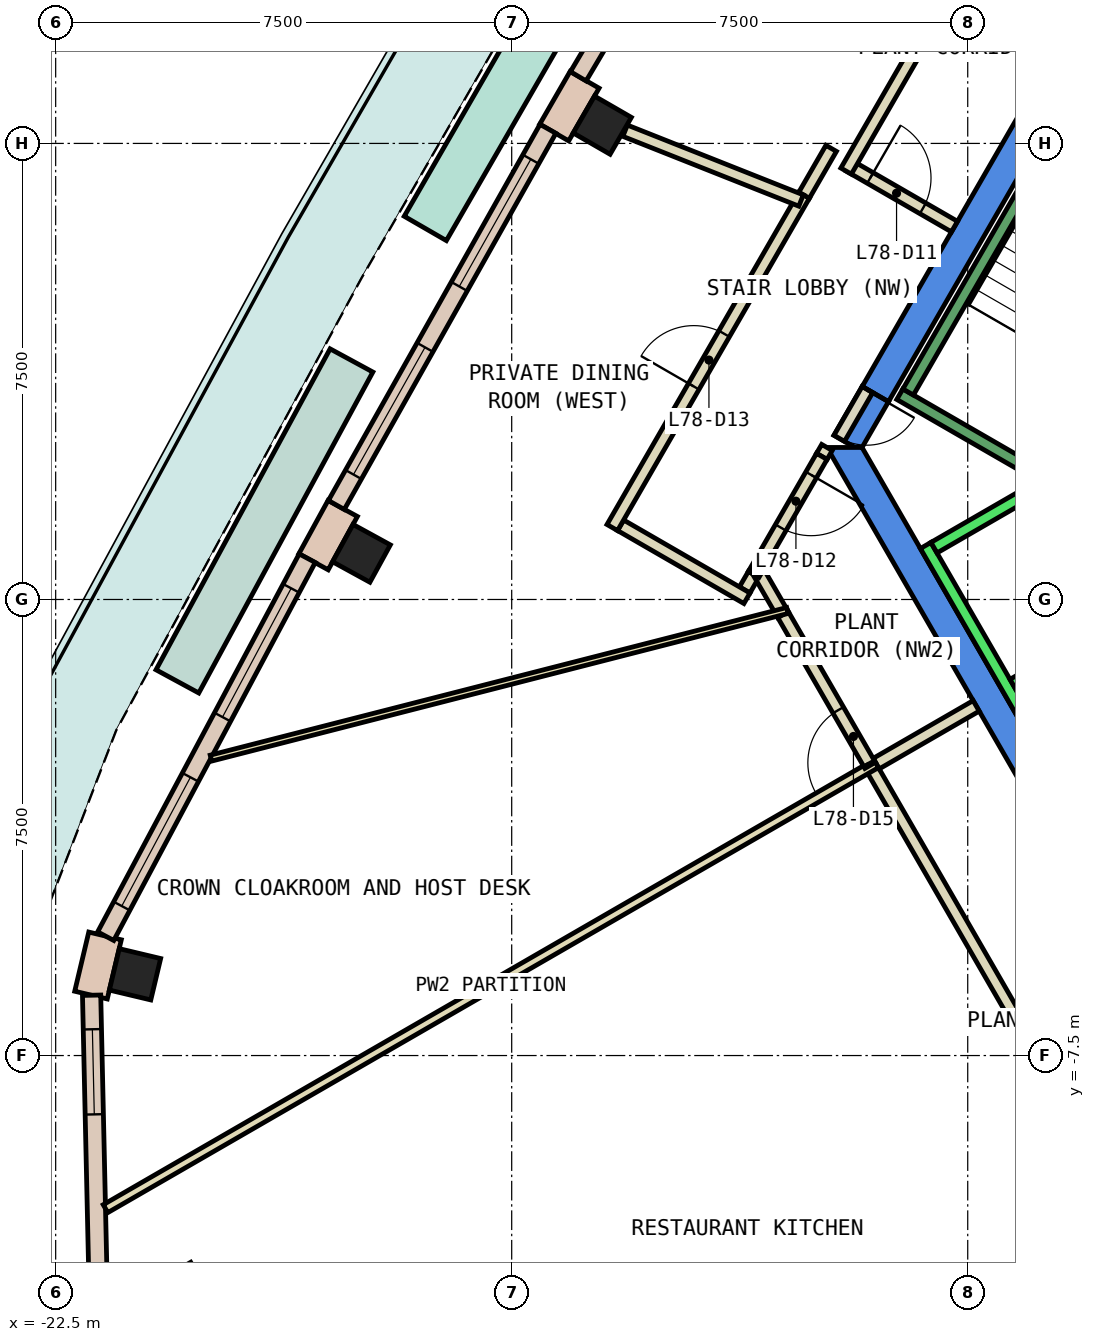
"""IFC4 building model, lengths in metres.
Left out: names, types, materials, properties, quantities, classifications, styles, units other than length and angle.
Written with IfcOpenShell. Run it as: python <this file> out.ifc"""

import sys

from ifc_helpers import new_model, si_unit, direction, frame, frame_2d, origin, origin_2d, place, context, subcontext, project, spatial, polyline, rectangle, outline, extrude, element, fill, save


model = new_model("IFC4")
c1 = context("Model", 3, precision=1e-05, world=origin(), true_north=direction((0.0, 1.0)))
c2 = subcontext(c1, "Body", "Model", "MODEL_VIEW")
j1 = project(units=[si_unit("LENGTHUNIT", "METRE"), si_unit("PLANEANGLEUNIT", "RADIAN")], contexts=[c1])
p1 = place(None, origin())
s1 = spatial("IfcSite", under=j1, at=p1, CompositionType="ELEMENT")
p2 = place(p1, origin())
s2 = spatial("IfcBuilding", under=s1, at=p2, CompositionType="ELEMENT")
p3 = place(p2, frame((0.0, 0.0, 331.4)))
s3 = spatial("IfcBuildingStorey", under=s2, at=p3, CompositionType="ELEMENT", Elevation=331.4)
for number, where, z_axis, x_axis in (
    (1, (-13.51, 7.8, 0.0), (0.0, 0.0, 1.0), (0.5, 0.866, 0.0)),
    (2, (-17.471, 0.759, 0.0), (0.0, 0.0, 1.0), (0.48, 0.877, 0.0)),
    (3, (-21.195, -6.164, 0.0), (0.0, 0.0, 1.0), (0.232, 0.973, 0.0)),
):
    element("IfcColumn", number, at=place(p3, frame(where, z_axis=z_axis, x_axis=x_axis)), inside=s3, PredefinedType="COLUMN", context=c2, shape_type="SweptSolid", body=[
        extrude(rectangle(XDim=0.7, YDim=0.7, at=origin_2d()), origin(), (0.0, 0.0, 1.0), 4.15),
    ])
p4 = place(p3, frame((-20.535, -11.856, 0.0), z_axis=(0.0, 0.0, 1.0), x_axis=(0.866025403784, 0.5, 0.0)))
e4 = element("IfcColumn", 4, at=p4, inside=s3, PredefinedType="COLUMN", context=c2, shape_type="SweptSolid", body=[
    extrude(rectangle(XDim=1.4, YDim=1.4, at=origin_2d()), origin(), (0.0, 0.0, 1.0), 4.15),
])
p5 = place(p3, frame((0.0, 0.0, -0.45)))
e5 = element("IfcWall", 5, at=p5, inside=s3, PredefinedType="SHEAR", context=c2, shape_type="SweptSolid", body=[
    extrude(outline(polyline([(-9.236, 3.502), (-8.803, 3.253), (-4.619, 10.5), (-4.907, 11.0), (-9.236, 3.502)])), origin(), (0.0, 0.0, 1.0), 4.6),
])
p6 = place(p3, frame((0.0, 0.0, 3.6)))
e6 = element("IfcWall", 6, at=p6, inside=s3, PredefinedType="SHEAR", context=c2, shape_type="SweptSolid", body=[
    extrude(outline(polyline([(-9.7, 2.7), (-9.354, 2.5), (-9.238, 2.5), (-8.803, 3.253), (-9.236, 3.502), (-9.7, 2.7)])), origin(), (0.0, 0.0, 1.0), 0.55),
])
p7 = place(p3, frame((0.0, 0.0, -0.45)))
e7 = element("IfcWall", 7, at=p7, inside=s3, PredefinedType="SHEAR", context=c2, shape_type="SweptSolid", body=[
    extrude(outline(polyline([(-9.815, 2.5), (-4.907, -6.0), (-4.619, -5.5), (-9.238, 2.5), (-9.815, 2.5)])), origin(), (0.0, 0.0, 1.0), 4.6),
])
p8 = place(p3, frame((-13.801, 8.546, 0.0), z_axis=(0.0, 0.0, 1.0), x_axis=(-0.49960277677, -0.866254619292, 0.0)))
e8 = element("IfcWall", 8, at=p8, inside=s3, PredefinedType="STANDARD", context=c2, shape_type="SweptSolid", body=[
    extrude(rectangle(XDim=1.001, YDim=0.55, at=frame_2d((0.5, 0.0))), origin(), (0.0, 0.0, 1.0), 4.15),
])
p9 = place(p3, frame((-17.779, 1.497, 0.0), z_axis=(0.0, 0.0, 1.0), x_axis=(-0.480117793957, -0.877204026396, 0.0)))
e9 = element("IfcWall", 9, at=p9, inside=s3, PredefinedType="STANDARD", context=c2, shape_type="SweptSolid", body=[
    extrude(rectangle(XDim=1.0, YDim=0.55, at=frame_2d((0.5, 0.0))), origin(), (0.0, 0.0, 1.0), 4.15),
])
p10 = place(p3, frame((-21.688, -5.533, 0.0), z_axis=(0.0, 0.0, 1.0), x_axis=(-0.230916459446, -0.972973580709, 0.0)))
e10 = element("IfcWall", 10, at=p10, inside=s3, PredefinedType="STANDARD", context=c2, shape_type="SweptSolid", body=[
    extrude(rectangle(XDim=1.0, YDim=0.55, at=frame_2d((0.5, 0.0))), origin(), (0.0, 0.0, 1.0), 4.15),
])
p11 = place(p3, frame((-10.287, 14.711, 0.0), z_axis=(0.0, 0.0, 1.0), x_axis=(-0.509697735304, -0.86035354281, 0.0)))
e11 = element("IfcWall", 11, at=p11, inside=s3, PredefinedType="STANDARD", context=c2, shape_type="SweptSolid", body=[
    extrude(rectangle(XDim=7.098, YDim=0.3, at=frame_2d((3.549, 0.0))), origin(), (0.0, 0.0, 1.0), 4.15),
])
p12 = place(p11, frame((0.775, 0.0, 0.0)))
e12 = element("IfcOpeningElement", 12, at=p12, cuts=e11, PredefinedType="OPENING", context=c2, shape_type="SweptSolid", body=[
    extrude(rectangle(XDim=2.0, YDim=2.4, at=frame_2d((1.0, 1.2))), frame((0.0, 0.16, 0.0), z_axis=(0.0, -1.0, 0.0), x_axis=(1.0, 0.0, 0.0)), (0.0, 0.0, 1.0), 0.32),
])
p13 = place(p11, frame((4.124, 0.0, 0.9)))
e13 = element("IfcOpeningElement", 13, at=p13, cuts=e11, PredefinedType="OPENING", context=c2, shape_type="SweptSolid", body=[
    extrude(rectangle(XDim=2.4, YDim=3.0, at=frame_2d((1.2, 1.5))), frame((0.0, 0.16, 0.0), z_axis=(0.0, -1.0, 0.0), x_axis=(1.0, 0.0, 0.0)), (0.0, 0.0, 1.0), 0.32),
])
p14 = place(p3, frame((-14.404, 7.74, 0.0), z_axis=(0.0, 0.0, 1.0), x_axis=(-0.49029716741, -0.871555326775, 0.0)))
e14 = element("IfcWall", 14, at=p14, inside=s3, PredefinedType="STANDARD", context=c2, shape_type="SweptSolid", body=[
    extrude(rectangle(XDim=7.098, YDim=0.3, at=frame_2d((3.549, 0.0))), origin(), (0.0, 0.0, 1.0), 4.15),
])
p15 = place(p14, frame((0.574, 0.0, 0.9)))
e15 = element("IfcOpeningElement", 15, at=p15, cuts=e14, PredefinedType="OPENING", context=c2, shape_type="SweptSolid", body=[
    extrude(rectangle(XDim=2.4, YDim=3.0, at=frame_2d((1.2, 1.5))), frame((0.0, 0.16, 0.0), z_axis=(0.0, -1.0, 0.0), x_axis=(1.0, 0.0, 0.0)), (0.0, 0.0, 1.0), 0.32),
])
p16 = place(p14, frame((4.123, 0.0, 0.9)))
e16 = element("IfcOpeningElement", 16, at=p16, cuts=e14, PredefinedType="OPENING", context=c2, shape_type="SweptSolid", body=[
    extrude(rectangle(XDim=2.4, YDim=3.0, at=frame_2d((1.2, 1.5))), frame((0.0, 0.16, 0.0), z_axis=(0.0, -1.0, 0.0), x_axis=(1.0, 0.0, 0.0)), (0.0, 0.0, 1.0), 0.32),
])
p17 = place(p3, frame((-18.363, 0.679, 0.0), z_axis=(0.0, 0.0, 1.0), x_axis=(-0.470447918342, -0.882427762555, 0.0)))
e17 = element("IfcWall", 17, at=p17, inside=s3, PredefinedType="STANDARD", context=c2, shape_type="SweptSolid", body=[
    extrude(rectangle(XDim=7.044, YDim=0.3, at=frame_2d((3.522, 0.0))), origin(), (0.0, 0.0, 1.0), 4.15),
])
p18 = place(p17, frame((0.561, 0.0, 0.9)))
e18 = element("IfcOpeningElement", 18, at=p18, cuts=e17, PredefinedType="OPENING", context=c2, shape_type="SweptSolid", body=[
    extrude(rectangle(XDim=2.4, YDim=3.0, at=frame_2d((1.2, 1.5))), frame((0.0, 0.16, 0.0), z_axis=(0.0, -1.0, 0.0), x_axis=(1.0, 0.0, 0.0)), (0.0, 0.0, 1.0), 0.32),
])
p19 = place(p17, frame((4.083, 0.0, 0.9)))
e19 = element("IfcOpeningElement", 19, at=p19, cuts=e17, PredefinedType="OPENING", context=c2, shape_type="SweptSolid", body=[
    extrude(rectangle(XDim=2.4, YDim=3.0, at=frame_2d((1.2, 1.5))), frame((0.0, 0.16, 0.0), z_axis=(0.0, -1.0, 0.0), x_axis=(1.0, 0.0, 0.0)), (0.0, 0.0, 1.0), 0.32),
])
p20 = place(p3, frame((-21.909, -6.508, 0.0), z_axis=(0.0, 0.0, 1.0), x_axis=(0.022431960078, -0.999748371925, 0.0)))
e20 = element("IfcWall", 20, at=p20, inside=s3, PredefinedType="STANDARD", context=c2, shape_type="SweptSolid", body=[
    extrude(rectangle(XDim=5.039, YDim=0.3, at=frame_2d((2.52, 0.0))), origin(), (0.0, 0.0, 1.0), 4.15),
])
p21 = place(p20, frame((0.56, 0.0, 0.9)))
e21 = element("IfcOpeningElement", 21, at=p21, cuts=e20, PredefinedType="OPENING", context=c2, shape_type="SweptSolid", body=[
    extrude(rectangle(XDim=1.4, YDim=3.0, at=frame_2d((0.7, 1.5))), frame((0.0, 0.16, 0.0), z_axis=(0.0, -1.0, 0.0), x_axis=(1.0, 0.0, 0.0)), (0.0, 0.0, 1.0), 0.32),
])
p22 = place(p3, frame((-13.495, 11.17, 0.0), z_axis=(0.0, 0.0, 1.0), x_axis=(-0.499980071345, -0.866036909293, 0.0)))
e22 = element("IfcWall", 22, at=p22, inside=s3, PredefinedType="STANDARD", context=c2, shape_type="SweptSolid", body=[
    extrude(rectangle(XDim=5.852, YDim=0.8, at=frame_2d((2.926, 0.0))), origin(), (0.0, 0.0, 1.0), 0.8),
])
p23 = place(p3, frame((-17.635, 3.931, 0.0), z_axis=(0.0, 0.0, 1.0), x_axis=(-0.476825343116, -0.878998061524, 0.0)))
e23 = element("IfcWall", 23, at=p23, inside=s3, PredefinedType="STANDARD", context=c2, shape_type="SweptSolid", body=[
    extrude(rectangle(XDim=6.004, YDim=0.8, at=frame_2d((3.002, 0.0))), origin(), (0.0, 0.0, 1.0), 0.8),
])
p24 = place(p3, frame((-6.112, -7.913, 0.0), z_axis=(0.0, 0.0, 1.0), x_axis=(-0.499915430684, 0.866074224396, 0.0)))
e24 = element("IfcWall", 24, at=p24, inside=s3, PredefinedType="PARTITIONING", context=c2, shape_type="SweptSolid", body=[
    extrude(rectangle(XDim=5.987, YDim=0.2, at=frame_2d((2.993, 0.0))), origin(), (0.0, 0.0, 1.0), 4.15),
])
p25 = place(p3, frame((-9.006, -2.7, 0.0), z_axis=(0.0, 0.0, 1.0), x_axis=(0.865980106173, 0.500078449558, 0.0)))
e25 = element("IfcWall", 25, at=p25, inside=s3, PredefinedType="PARTITIONING", context=c2, shape_type="SweptSolid", body=[
    extrude(rectangle(XDim=1.9, YDim=0.2, at=frame_2d((0.95, 0.0))), origin(), (0.0, 0.0, 1.0), 4.15),
])
p26 = place(p3, frame((-21.68, -10.018, 0.0), z_axis=(0.0, 0.0, 1.0), x_axis=(0.865999449672, 0.500044951147, 0.0)))
e26 = element("IfcWall", 26, at=p26, inside=s3, PredefinedType="PARTITIONING", context=c2, shape_type="SweptSolid", body=[
    extrude(rectangle(XDim=14.635, YDim=0.15, at=frame_2d((7.317, 0.0))), origin(), (0.0, 0.0, 1.0), 4.15),
])
p27 = place(p3, frame((-9.45, 7.132, 0.0), z_axis=(0.0, 0.0, 1.0), x_axis=(0.866010750942, -0.50002537861, 0.0)))
e27 = element("IfcWall", 27, at=p27, inside=s3, PredefinedType="PARTITIONING", context=c2, shape_type="SweptSolid", body=[
    extrude(rectangle(XDim=2.0, YDim=0.2, at=frame_2d((1.0, 0.0))), origin(), (0.0, 0.0, 1.0), 4.15),
])
p28 = place(p27, frame((0.4, 0.0, 0.0)))
e28 = element("IfcOpeningElement", 28, at=p28, cuts=e27, PredefinedType="OPENING", context=c2, shape_type="SweptSolid", body=[
    extrude(rectangle(XDim=1.0, YDim=2.1, at=frame_2d((0.5, 1.05))), frame((0.0, 0.11, 0.0), z_axis=(0.0, -1.0, 0.0), x_axis=(1.0, 0.0, 0.0)), (0.0, 0.0, 1.0), 0.22),
])
p29 = place(p3, frame((-9.815, 2.5, 0.0), z_axis=(0.0, 0.0, 1.0), x_axis=(-0.5004692653, -0.865754303766, 0.0)))
e29 = element("IfcWall", 29, at=p29, inside=s3, PredefinedType="PARTITIONING", context=c2, shape_type="SweptSolid", body=[
    extrude(rectangle(XDim=0.17, YDim=0.2, at=frame_2d((0.085, 0.0))), origin(), (0.0, 0.0, 1.0), 2.4),
])
p30 = place(p3, frame((-11.02, 0.413, 0.0), z_axis=(0.0, 0.0, 1.0), x_axis=(-0.500222587251, -0.865896854829, 0.0)))
e30 = element("IfcWall", 30, at=p30, inside=s3, PredefinedType="PARTITIONING", context=c2, shape_type="SweptSolid", body=[
    extrude(rectangle(XDim=0.296, YDim=0.2, at=frame_2d((0.148, 0.0))), origin(), (0.0, 0.0, 1.0), 4.15),
])
p31 = place(p3, frame((-11.131, 0.02, 0.0), z_axis=(0.0, 0.0, 1.0), x_axis=(-0.865973769406, 0.500089422704, 0.0)))
e31 = element("IfcWall", 31, at=p31, inside=s3, PredefinedType="PARTITIONING", context=c2, shape_type="SweptSolid", body=[
    extrude(rectangle(XDim=2.399, YDim=0.2, at=frame_2d((1.2, 0.0))), origin(), (0.0, 0.0, 1.0), 4.15),
])
p32 = place(p3, frame((-13.346, 1.183, 0.0), z_axis=(0.0, 0.0, 1.0), x_axis=(0.49998814853, 0.866032246126, 0.0)))
e32 = element("IfcWall", 32, at=p32, inside=s3, PredefinedType="PARTITIONING", context=c2, shape_type="SweptSolid", body=[
    extrude(rectangle(XDim=6.31, YDim=0.2, at=frame_2d((3.155, 0.0))), origin(), (0.0, 0.0, 1.0), 4.15),
])
p33 = place(p32, frame((2.68, 0.0, 0.0)))
e33 = element("IfcOpeningElement", 33, at=p33, cuts=e32, PredefinedType="OPENING", context=c2, shape_type="SweptSolid", body=[
    extrude(rectangle(XDim=1.0, YDim=2.1, at=frame_2d((0.5, 1.05))), frame((0.0, 0.11, 0.0), z_axis=(0.0, -1.0, 0.0), x_axis=(1.0, 0.0, 0.0)), (0.0, 0.0, 1.0), 0.22),
])
p34 = place(p3, frame((-10.191, 6.648, 0.0), z_axis=(0.0, 0.0, 1.0), x_axis=(0.49973828311, 0.866176453382, 0.0)))
e34 = element("IfcWall", 34, at=p34, inside=s3, PredefinedType="PARTITIONING", context=c2, shape_type="SweptSolid", body=[
    extrude(rectangle(XDim=0.89, YDim=0.2, at=frame_2d((0.445, 0.0))), origin(), (0.0, 0.0, 1.0), 4.15),
])
p35 = place(p3, frame((-9.5, 7.045, 0.0), z_axis=(0.0, 0.0, 1.0), x_axis=(0.499966812698, 0.866044563634, 0.0)))
e35 = element("IfcWall", 35, at=p35, inside=s3, PredefinedType="PARTITIONING", context=c2, shape_type="SweptSolid", body=[
    extrude(rectangle(XDim=6.977, YDim=0.2, at=frame_2d((3.488, 0.0))), origin(), (0.0, 0.0, 1.0), 4.15),
])
p36 = place(p35, frame((5.826, 0.0, 0.0)))
e36 = element("IfcOpeningElement", 36, at=p36, cuts=e35, PredefinedType="OPENING", context=c2, shape_type="SweptSolid", body=[
    extrude(rectangle(XDim=1.0, YDim=2.1, at=frame_2d((0.5, 1.05))), frame((0.0, 0.11, 0.0), z_axis=(0.0, -1.0, 0.0), x_axis=(1.0, 0.0, 0.0)), (0.0, 0.0, 1.0), 0.22),
])
p37 = place(p3, frame((-10.537, -0.249, 0.0), z_axis=(0.0, 0.0, 1.0), x_axis=(-0.500357525511, 0.865818887912, 0.0)))
e37 = element("IfcWall", 37, at=p37, inside=s3, PredefinedType="PARTITIONING", context=c2, shape_type="SweptSolid", body=[
    extrude(rectangle(XDim=0.865, YDim=0.2, at=frame_2d((0.433, 0.0))), origin(), (0.0, 0.0, 1.0), 4.15),
])
p38 = place(p3, frame((-9.105, -2.728, 0.0), z_axis=(0.0, 0.0, 1.0), x_axis=(-0.500229291894, 0.86589298157, 0.0)))
e38 = element("IfcWall", 38, at=p38, inside=s3, PredefinedType="PARTITIONING", context=c2, shape_type="SweptSolid", body=[
    extrude(rectangle(XDim=2.863, YDim=0.2, at=frame_2d((1.432, 0.0))), origin(), (0.0, 0.0, 1.0), 4.15),
])
p39 = place(p38, frame((0.049, 0.0, 0.0)))
e39 = element("IfcOpeningElement", 39, at=p39, cuts=e38, PredefinedType="OPENING", context=c2, shape_type="SweptSolid", body=[
    extrude(rectangle(XDim=1.0, YDim=2.1, at=frame_2d((0.5, 1.05))), frame((0.0, 0.11, 0.0), z_axis=(0.0, -1.0, 0.0), x_axis=(1.0, 0.0, 0.0)), (0.0, 0.0, 1.0), 0.22),
])
p40 = place(p3, frame((-13.135, 7.709, 0.0), z_axis=(0.0, 0.0, 1.0), x_axis=(0.929543616209, -0.368712171707, 0.0)))
e40 = element("IfcWall", 40, at=p40, inside=s3, PredefinedType="PARTITIONING", context=c2, shape_type="SweptSolid", body=[
    extrude(rectangle(XDim=3.113, YDim=0.2, at=frame_2d((1.557, 0.0))), origin(), (0.0, 0.0, 1.0), 4.15),
])
p41 = place(p3, frame((-10.465, -0.181, 0.0), z_axis=(0.0, 0.0, 1.0), x_axis=(-0.968738459131, -0.248084255448, 0.0)))
e41 = element("IfcWall", 41, at=p41, inside=s3, PredefinedType="PARTITIONING", context=c2, shape_type="SweptSolid", body=[
    extrude(rectangle(XDim=9.787, YDim=0.1, at=frame_2d((4.894, 0.0))), origin(), (0.0, 0.0, 1.0), 4.15),
])
p42 = place(p3, frame((-9.15, 3.452, 0.0), z_axis=(0.0, 0.0, 1.0), x_axis=(-0.500079945886, -0.865979242085, 0.0)))
e42 = element("IfcWall", 42, at=p42, inside=s3, PredefinedType="PARTITIONING", context=c2, shape_type="SweptSolid", body=[
    extrude(rectangle(XDim=0.926, YDim=0.2, at=frame_2d((0.463, 0.0))), origin(), (0.0, 0.0, 1.0), 2.4),
])
p43 = place(p42, frame((0.017, 0.0, 0.0)))
e43 = element("IfcOpeningElement", 43, at=p43, cuts=e42, PredefinedType="OPENING", context=c2, shape_type="SweptSolid", body=[
    extrude(rectangle(XDim=0.9, YDim=2.1, at=frame_2d((0.45, 1.05))), frame((0.0, 0.11, 0.0), z_axis=(0.0, -1.0, 0.0), x_axis=(1.0, 0.0, 0.0)), (0.0, 0.0, 1.0), 0.22),
])
p44 = place(p3, frame((-9.9, 2.353, 0.0), z_axis=(0.0, 0.0, 1.0), x_axis=(-0.500030632641, -0.866007717299, 0.0)))
e44 = element("IfcWall", 44, at=p44, inside=s3, PredefinedType="PARTITIONING", context=c2, shape_type="SweptSolid", body=[
    extrude(rectangle(XDim=2.24, YDim=0.2, at=frame_2d((1.12, 0.0))), origin(), (0.0, 0.0, 1.0), 4.15),
])
p45 = place(p44, frame((0.351, 0.0, 0.0)))
e45 = element("IfcOpeningElement", 45, at=p45, cuts=e44, PredefinedType="OPENING", context=c2, shape_type="SweptSolid", body=[
    extrude(rectangle(XDim=1.0, YDim=2.1, at=frame_2d((0.5, 1.05))), frame((0.0, 0.11, 0.0), z_axis=(0.0, -1.0, 0.0), x_axis=(1.0, 0.0, 0.0)), (0.0, 0.0, 1.0), 0.22),
])
p46 = place(p3, frame((-8.192, 0.888, 0.0), z_axis=(0.0, 0.0, 1.0), x_axis=(0.500034260056, -0.866005622828, 0.0)))
e46 = element("IfcWall", 46, at=p46, inside=s3, PredefinedType="STANDARD", context=c2, shape_type="SweptSolid", body=[
    extrude(rectangle(XDim=5.399, YDim=0.2, at=frame_2d((2.7, 0.0))), origin(), (0.0, 0.0, 1.0), 4.15),
])
for number, where, z_axis, x_axis in (
    (47, (-5.977, 2.052, 0.0), (0.0, 0.0, 1.0), (-0.866, -0.5, 0.0)),
    (48, (-4.677, -0.2, 0.0), (0.0, 0.0, 1.0), (-0.866, -0.5, 0.0)),
):
    element("IfcWall", number, at=place(p3, frame(where, z_axis=z_axis, x_axis=x_axis)), inside=s3, PredefinedType="STANDARD", context=c2, shape_type="SweptSolid", body=[
        extrude(rectangle(XDim=2.399, YDim=0.2, at=frame_2d((1.2, 0.0))), origin(), (0.0, 0.0, 1.0), 4.15),
    ])
p47 = place(p3, frame((-6.25, 2.01, 0.0), z_axis=(0.0, 0.0, 1.0), x_axis=(-0.86611865017, 0.499838457731, 0.0)))
e49 = element("IfcWall", 49, at=p47, inside=s3, PredefinedType="STANDARD", context=c2, shape_type="SweptSolid", body=[
    extrude(rectangle(XDim=2.733, YDim=0.2, at=frame_2d((1.366, 0.0))), origin(), (0.0, 0.0, 1.0), 4.15),
])
p48 = place(p3, frame((-5.03, 9.388, 0.0), z_axis=(0.0, 0.0, 1.0), x_axis=(-0.499978703459, -0.866037698999, 0.0)))
e50 = element("IfcWall", 50, at=p48, inside=s3, PredefinedType="STANDARD", context=c2, shape_type="SweptSolid", body=[
    extrude(rectangle(XDim=6.9, YDim=0.2, at=frame_2d((3.45, 0.0))), origin(), (0.0, 0.0, 1.0), 4.15),
])
p49 = place(p15, origin())
e51 = element("IfcWindow", 51, at=p49, inside=s3, PartitioningType="SINGLE_PANEL", PredefinedType="WINDOW", context=c2, shape_type="SweptSolid", body=[
    extrude(rectangle(XDim=2.4, YDim=3.0, at=frame_2d((1.2, 1.5))), frame((0.0, 0.03, 0.0), z_axis=(0.0, -1.0, 0.0), x_axis=(1.0, 0.0, 0.0)), (0.0, 0.0, 1.0), 0.06),
])
fill(e15, e51)
p50 = place(p16, origin())
e52 = element("IfcWindow", 52, at=p50, inside=s3, PartitioningType="SINGLE_PANEL", PredefinedType="WINDOW", context=c2, shape_type="SweptSolid", body=[
    extrude(rectangle(XDim=2.4, YDim=3.0, at=frame_2d((1.2, 1.5))), frame((0.0, 0.03, 0.0), z_axis=(0.0, -1.0, 0.0), x_axis=(1.0, 0.0, 0.0)), (0.0, 0.0, 1.0), 0.06),
])
fill(e16, e52)
p51 = place(p18, origin())
e53 = element("IfcWindow", 53, at=p51, inside=s3, PartitioningType="SINGLE_PANEL", PredefinedType="WINDOW", context=c2, shape_type="SweptSolid", body=[
    extrude(rectangle(XDim=2.4, YDim=3.0, at=frame_2d((1.2, 1.5))), frame((0.0, 0.03, 0.0), z_axis=(0.0, -1.0, 0.0), x_axis=(1.0, 0.0, 0.0)), (0.0, 0.0, 1.0), 0.06),
])
fill(e18, e53)
p52 = place(p19, origin())
e54 = element("IfcWindow", 54, at=p52, inside=s3, PartitioningType="SINGLE_PANEL", PredefinedType="WINDOW", context=c2, shape_type="SweptSolid", body=[
    extrude(rectangle(XDim=2.4, YDim=3.0, at=frame_2d((1.2, 1.5))), frame((0.0, 0.03, 0.0), z_axis=(0.0, -1.0, 0.0), x_axis=(1.0, 0.0, 0.0)), (0.0, 0.0, 1.0), 0.06),
])
fill(e19, e54)
p53 = place(p21, origin())
e55 = element("IfcWindow", 55, at=p53, inside=s3, PartitioningType="SINGLE_PANEL", PredefinedType="WINDOW", context=c2, shape_type="SweptSolid", body=[
    extrude(rectangle(XDim=1.4, YDim=3.0, at=frame_2d((0.7, 1.5))), frame((0.0, 0.03, 0.0), z_axis=(0.0, -1.0, 0.0), x_axis=(1.0, 0.0, 0.0)), (0.0, 0.0, 1.0), 0.06),
])
fill(e21, e55)
p54 = place(p28, origin())
e56 = element("IfcDoor", 56, at=p54, inside=s3, OperationType="SINGLE_SWING_LEFT", PredefinedType="DOOR", context=c2, shape_type="SweptSolid", body=[
    extrude(rectangle(XDim=1.0, YDim=2.1, at=frame_2d((0.5, 1.05))), frame((0.0, 0.025, 0.0), z_axis=(0.0, -1.0, 0.0), x_axis=(1.0, 0.0, 0.0)), (0.0, 0.0, 1.0), 0.05),
])
fill(e28, e56)
p55 = place(p45, origin())
e57 = element("IfcDoor", 57, at=p55, inside=s3, OperationType="SINGLE_SWING_RIGHT", PredefinedType="DOOR", context=c2, shape_type="SweptSolid", body=[
    extrude(rectangle(XDim=1.0, YDim=2.1, at=frame_2d((0.5, 1.05))), frame((0.0, 0.025, 0.0), z_axis=(0.0, -1.0, 0.0), x_axis=(1.0, 0.0, 0.0)), (0.0, 0.0, 1.0), 0.05),
])
fill(e45, e57)
p56 = place(p33, origin())
e58 = element("IfcDoor", 58, at=p56, inside=s3, OperationType="SINGLE_SWING_LEFT", PredefinedType="DOOR", context=c2, shape_type="SweptSolid", body=[
    extrude(rectangle(XDim=1.0, YDim=2.1, at=frame_2d((0.5, 1.05))), frame((0.0, 0.025, 0.0), z_axis=(0.0, -1.0, 0.0), x_axis=(1.0, 0.0, 0.0)), (0.0, 0.0, 1.0), 0.05),
])
fill(e33, e58)
p57 = place(p39, origin())
e59 = element("IfcDoor", 59, at=p57, inside=s3, OperationType="SINGLE_SWING_LEFT", PredefinedType="DOOR", context=c2, shape_type="SweptSolid", body=[
    extrude(rectangle(XDim=1.0, YDim=2.1, at=frame_2d((0.5, 1.05))), frame((0.0, 0.025, 0.0), z_axis=(0.0, -1.0, 0.0), x_axis=(1.0, 0.0, 0.0)), (0.0, 0.0, 1.0), 0.05),
])
fill(e39, e59)
p58 = place(p43, origin())
e60 = element("IfcDoor", 60, at=p58, inside=s3, OperationType="SINGLE_SWING_LEFT", PredefinedType="DOOR", context=c2, shape_type="SweptSolid", body=[
    extrude(rectangle(XDim=0.9, YDim=2.1, at=frame_2d((0.45, 1.05))), frame((0.0, 0.025, 0.0), z_axis=(0.0, -1.0, 0.0), x_axis=(1.0, 0.0, 0.0)), (0.0, 0.0, 1.0), 0.05),
])
fill(e43, e60)
save(model, sys.argv[1])
